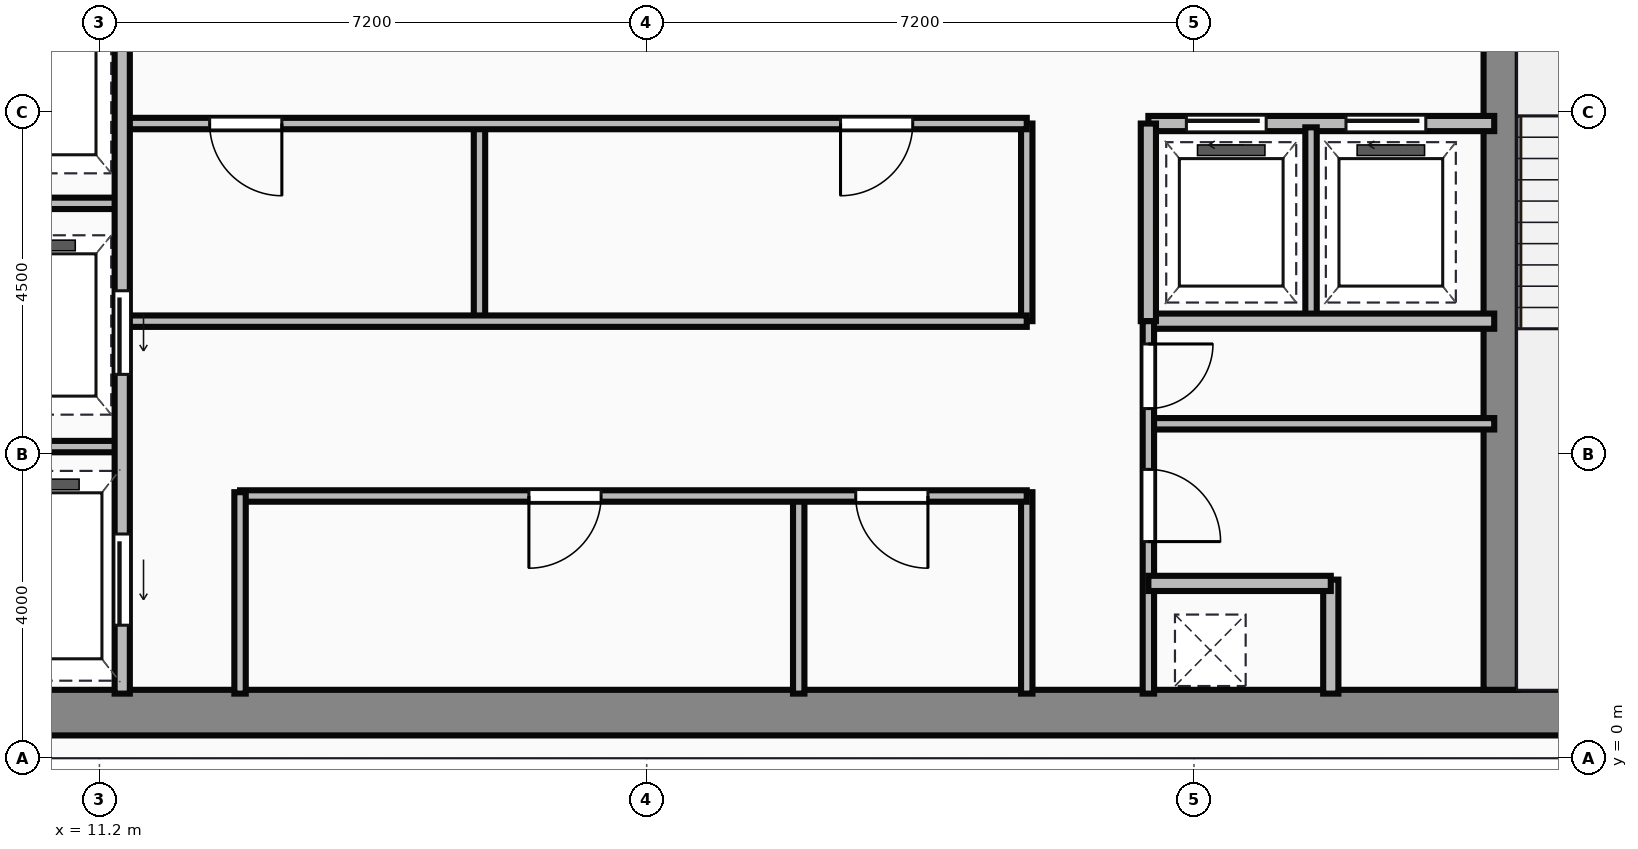
"""IFC4 building model, lengths in metres.
Left out: names, types, materials, properties, quantities, classifications, styles, units other than length and angle.
Written with IfcOpenShell. Run it as: python <this file> out.ifc"""

import sys

from ifc_helpers import new_model, si_unit, direction, frame, frame_2d, origin, place, context, subcontext, project, spatial, rectangle, extrude, source, transform, mapped, element, fill, save


model = new_model("IFC4")
c1 = context("Model", 3, precision=1e-05, world=origin(), true_north=direction((0.0, 1.0)))
c2 = subcontext(c1, "Body", "Model", "MODEL_VIEW")
j1 = project(units=[si_unit("LENGTHUNIT", "METRE"), si_unit("PLANEANGLEUNIT", "RADIAN")], contexts=[c1])
p1 = place(None, origin())
s1 = spatial("IfcSite", under=j1, at=p1, CompositionType="ELEMENT")
p2 = place(p1, origin())
s2 = spatial("IfcBuilding", under=s1, at=p2, CompositionType="ELEMENT")
p3 = place(p2, frame((0.0, 0.0, 228.75)))
s3 = spatial("IfcBuildingStorey", under=s2, at=p3, CompositionType="ELEMENT", Elevation=228.75)
m1 = source(origin(), c2, "Body", "SweptSolid", [
    extrude(rectangle(XDim=29.5, YDim=0.6, at=frame_2d((14.75, 0.0))), origin(), (0.0, 0.0, 1.0), 3.65),
])
p4 = place(p3, frame((4.5, 0.6, 0.0), z_axis=(0.0, 0.0, 1.0), x_axis=(1.0, 0.0, 0.0)))
e1 = element("IfcWall", 1, at=p4, inside=s3, PredefinedType="SHEAR", context=c2, shape_type="MappedRepresentation", body=[
    mapped(m1, transform((0.0, 0.0, 0.0))),
])
m2 = source(origin(), c2, "Body", "SweptSolid", [
    extrude(rectangle(XDim=12.5, YDim=0.45, at=frame_2d((6.25, 0.0))), origin(), (0.0, 0.0, 1.0), 3.65),
])
p5 = place(p3, frame((29.635, 0.9, 0.0), z_axis=(0.0, 0.0, 1.0), x_axis=(0.0, 1.0, 0.0)))
e2 = element("IfcWall", 2, at=p5, inside=s3, PredefinedType="SHEAR", context=c2, shape_type="MappedRepresentation", body=[
    mapped(m2, transform((0.0, 0.0, 0.0))),
])
m3 = source(origin(), c2, "Body", "SweptSolid", [
    extrude(rectangle(XDim=9.6, YDim=0.2, at=frame_2d((4.8, 0.0))), origin(), (0.0, 0.0, 1.0), 3.4),
])
p6 = place(p3, frame((11.5, 0.85, 0.0), z_axis=(0.0, 0.0, 1.0), x_axis=(0.0, 1.0, 0.0)))
e3 = element("IfcWall", 3, at=p6, inside=s3, PredefinedType="PARTITIONING", context=c2, shape_type="MappedRepresentation", body=[
    mapped(m3, transform((0.0, 0.0, 0.0))),
])
p7 = place(p6, frame((4.2, 0.0, 0.0)))
e4 = element("IfcOpeningElement", 4, at=p7, cuts=e3, PredefinedType="OPENING", context=c2, shape_type="SweptSolid", body=[
    extrude(rectangle(XDim=1.1, YDim=2.15, at=frame_2d((0.55, 1.075))), frame((0.0, 0.11, 0.0), z_axis=(0.0, -1.0, 0.0), x_axis=(1.0, 0.0, 0.0)), (0.0, 0.0, 1.0), 0.22),
])
p8 = place(p6, frame((0.9, 0.0, 0.0)))
e5 = element("IfcOpeningElement", 5, at=p8, cuts=e3, PredefinedType="OPENING", context=c2, shape_type="SweptSolid", body=[
    extrude(rectangle(XDim=1.2, YDim=2.15, at=frame_2d((0.6, 1.075))), frame((0.0, 0.11, 0.0), z_axis=(0.0, -1.0, 0.0), x_axis=(1.0, 0.0, 0.0)), (0.0, 0.0, 1.0), 0.22),
])
m4 = source(origin(), c2, "Body", "SweptSolid", [
    extrude(rectangle(XDim=2.4, YDim=0.15, at=frame_2d((1.2, 0.0))), origin(), (0.0, 0.0, 1.0), 3.4),
])
for number, where, z_axis, x_axis in (
    (6, (9.1, 4.1, 0.0), (0.0, 0.0, 1.0), (1.0, 0.0, 0.0)),
    (7, (9.1, 7.3, 0.0), (0.0, 0.0, 1.0), (1.0, 0.0, 0.0)),
):
    element("IfcWall", number, at=place(p3, frame(where, z_axis=z_axis, x_axis=x_axis)), inside=s3, PredefinedType="PARTITIONING", context=c2, shape_type="MappedRepresentation", body=[
        mapped(m4, transform((0.0, 0.0, 0.0))),
    ])
m5 = source(origin(), c2, "Body", "SweptSolid", [
    extrude(rectangle(XDim=2.65, YDim=0.15, at=frame_2d((1.325, 0.0))), origin(), (0.0, 0.0, 1.0), 3.4),
])
p9 = place(p3, frame((13.05, 0.85, 0.0), z_axis=(0.0, 0.0, 1.0), x_axis=(0.0, 1.0, 0.0)))
e8 = element("IfcWall", 8, at=p9, inside=s3, PredefinedType="PARTITIONING", context=c2, shape_type="MappedRepresentation", body=[
    mapped(m5, transform((0.0, 0.0, 0.0))),
])
m6 = source(origin(), c2, "Body", "SweptSolid", [
    extrude(rectangle(XDim=10.35, YDim=0.15, at=frame_2d((5.175, 0.0))), origin(), (0.0, 0.0, 1.0), 3.4),
])
p10 = place(p3, frame((13.05, 3.45, 0.0), z_axis=(0.0, 0.0, 1.0), x_axis=(1.0, 0.0, 0.0)))
e9 = element("IfcWall", 9, at=p10, inside=s3, PredefinedType="PARTITIONING", context=c2, shape_type="MappedRepresentation", body=[
    mapped(m6, transform((0.0, 0.0, 0.0))),
])
p11 = place(p10, frame((3.8, 0.0, 0.0)))
e10 = element("IfcOpeningElement", 10, at=p11, cuts=e9, PredefinedType="OPENING", context=c2, shape_type="SweptSolid", body=[
    extrude(rectangle(XDim=0.95, YDim=2.15, at=frame_2d((0.475, 1.075))), frame((0.0, 0.085, 0.0), z_axis=(0.0, -1.0, 0.0), x_axis=(1.0, 0.0, 0.0)), (0.0, 0.0, 1.0), 0.17),
])
p12 = place(p10, frame((8.1, 0.0, 0.0)))
e11 = element("IfcOpeningElement", 11, at=p12, cuts=e9, PredefinedType="OPENING", context=c2, shape_type="SweptSolid", body=[
    extrude(rectangle(XDim=0.95, YDim=2.15, at=frame_2d((0.475, 1.075))), frame((0.0, 0.085, 0.0), z_axis=(0.0, -1.0, 0.0), x_axis=(1.0, 0.0, 0.0)), (0.0, 0.0, 1.0), 0.17),
])
p13 = place(p3, frame((23.4, 0.85, 0.0), z_axis=(0.0, 0.0, 1.0), x_axis=(0.0, 1.0, 0.0)))
e12 = element("IfcWall", 12, at=p13, inside=s3, PredefinedType="PARTITIONING", context=c2, shape_type="MappedRepresentation", body=[
    mapped(m5, transform((0.0, 0.0, 0.0))),
])
m7 = source(origin(), c2, "Body", "SweptSolid", [
    extrude(rectangle(XDim=2.6, YDim=0.15, at=frame_2d((1.3, 0.0))), origin(), (0.0, 0.0, 1.0), 3.4),
])
p14 = place(p3, frame((20.4, 0.85, 0.0), z_axis=(0.0, 0.0, 1.0), x_axis=(0.0, 1.0, 0.0)))
e13 = element("IfcWall", 13, at=p14, inside=s3, PredefinedType="PARTITIONING", context=c2, shape_type="MappedRepresentation", body=[
    mapped(m7, transform((0.0, 0.0, 0.0))),
])
m8 = source(origin(), c2, "Body", "SweptSolid", [
    extrude(rectangle(XDim=11.85, YDim=0.15, at=frame_2d((5.925, 0.0))), origin(), (0.0, 0.0, 1.0), 3.4),
])
p15 = place(p3, frame((11.55, 5.75, 0.0), z_axis=(0.0, 0.0, 1.0), x_axis=(1.0, 0.0, 0.0)))
e14 = element("IfcWall", 14, at=p15, inside=s3, PredefinedType="PARTITIONING", context=c2, shape_type="MappedRepresentation", body=[
    mapped(m8, transform((0.0, 0.0, 0.0))),
])
p16 = place(p3, frame((11.55, 8.35, 0.0), z_axis=(0.0, 0.0, 1.0), x_axis=(1.0, 0.0, 0.0)))
e15 = element("IfcWall", 15, at=p16, inside=s3, PredefinedType="PARTITIONING", context=c2, shape_type="MappedRepresentation", body=[
    mapped(m8, transform((0.0, 0.0, 0.0))),
])
p17 = place(p16, frame((1.1, 0.0, 0.0)))
e16 = element("IfcOpeningElement", 16, at=p17, cuts=e15, PredefinedType="OPENING", context=c2, shape_type="SweptSolid", body=[
    extrude(rectangle(XDim=0.95, YDim=2.15, at=frame_2d((0.475, 1.075))), frame((0.0, 0.085, 0.0), z_axis=(0.0, -1.0, 0.0), x_axis=(1.0, 0.0, 0.0)), (0.0, 0.0, 1.0), 0.17),
])
p18 = place(p16, frame((9.4, 0.0, 0.0)))
e17 = element("IfcOpeningElement", 17, at=p18, cuts=e15, PredefinedType="OPENING", context=c2, shape_type="SweptSolid", body=[
    extrude(rectangle(XDim=0.95, YDim=2.15, at=frame_2d((0.475, 1.075))), frame((0.0, 0.085, 0.0), z_axis=(0.0, -1.0, 0.0), x_axis=(1.0, 0.0, 0.0)), (0.0, 0.0, 1.0), 0.17),
])
m9 = source(origin(), c2, "Body", "SweptSolid", [
    extrude(rectangle(XDim=2.6, YDim=0.15, at=frame_2d((1.3, 0.0))), origin(), (0.0, 0.0, 1.0), 3.4),
])
p19 = place(p3, frame((23.4, 5.75, 0.0), z_axis=(0.0, 0.0, 1.0), x_axis=(0.0, 1.0, 0.0)))
e18 = element("IfcWall", 18, at=p19, inside=s3, PredefinedType="PARTITIONING", context=c2, shape_type="MappedRepresentation", body=[
    mapped(m9, transform((0.0, 0.0, 0.0))),
])
m10 = source(origin(), c2, "Body", "SweptSolid", [
    extrude(rectangle(XDim=2.5, YDim=0.15, at=frame_2d((1.25, 0.0))), origin(), (0.0, 0.0, 1.0), 3.4),
])
p20 = place(p3, frame((16.2, 5.8, 0.0), z_axis=(0.0, 0.0, 1.0), x_axis=(0.0, 1.0, 0.0)))
e19 = element("IfcWall", 19, at=p20, inside=s3, PredefinedType="PARTITIONING", context=c2, shape_type="MappedRepresentation", body=[
    mapped(m10, transform((0.0, 0.0, 0.0))),
])
m11 = source(origin(), c2, "Body", "SweptSolid", [
    extrude(rectangle(XDim=4.55, YDim=0.2, at=frame_2d((2.275, 0.0))), origin(), (0.0, 0.0, 1.0), 3.4),
])
p21 = place(p3, frame((25.0, 8.35, 0.0), z_axis=(0.0, 0.0, 1.0), x_axis=(1.0, 0.0, 0.0)))
e20 = element("IfcWall", 20, at=p21, inside=s3, PredefinedType="PARTITIONING", context=c2, shape_type="MappedRepresentation", body=[
    mapped(m11, transform((0.0, 0.0, 0.0))),
])
p22 = place(p21, frame((0.5, 0.0, 0.0)))
e21 = element("IfcOpeningElement", 21, at=p22, cuts=e20, PredefinedType="OPENING", context=c2, shape_type="SweptSolid", body=[
    extrude(rectangle(XDim=1.05, YDim=2.15, at=frame_2d((0.525, 1.075))), frame((0.0, 0.11, 0.0), z_axis=(0.0, -1.0, 0.0), x_axis=(1.0, 0.0, 0.0)), (0.0, 0.0, 1.0), 0.22),
])
p23 = place(p21, frame((2.6, 0.0, 0.0)))
e22 = element("IfcOpeningElement", 22, at=p23, cuts=e20, PredefinedType="OPENING", context=c2, shape_type="SweptSolid", body=[
    extrude(rectangle(XDim=1.05, YDim=2.15, at=frame_2d((0.525, 1.075))), frame((0.0, 0.11, 0.0), z_axis=(0.0, -1.0, 0.0), x_axis=(1.0, 0.0, 0.0)), (0.0, 0.0, 1.0), 0.22),
])
p24 = place(p3, frame((25.0, 5.75, 0.0), z_axis=(0.0, 0.0, 1.0), x_axis=(1.0, 0.0, 0.0)))
e23 = element("IfcWall", 23, at=p24, inside=s3, PredefinedType="PARTITIONING", context=c2, shape_type="MappedRepresentation", body=[
    mapped(m11, transform((0.0, 0.0, 0.0))),
])
m12 = source(origin(), c2, "Body", "SweptSolid", [
    extrude(rectangle(XDim=2.6, YDim=0.2, at=frame_2d((1.3, 0.0))), origin(), (0.0, 0.0, 1.0), 3.4),
])
p25 = place(p3, frame((25.0, 5.75, 0.0), z_axis=(0.0, 0.0, 1.0), x_axis=(0.0, 1.0, 0.0)))
e24 = element("IfcWall", 24, at=p25, inside=s3, PredefinedType="PARTITIONING", context=c2, shape_type="MappedRepresentation", body=[
    mapped(m12, transform((0.0, 0.0, 0.0))),
])
p26 = place(p3, frame((27.14, 5.8, 0.0), z_axis=(0.0, 0.0, 1.0), x_axis=(0.0, 1.0, 0.0)))
e25 = element("IfcWall", 25, at=p26, inside=s3, PredefinedType="PARTITIONING", context=c2, shape_type="MappedRepresentation", body=[
    mapped(m10, transform((0.0, 0.0, 0.0))),
])
m13 = source(origin(), c2, "Body", "SweptSolid", [
    extrude(rectangle(XDim=4.9, YDim=0.15, at=frame_2d((2.45, 0.0))), origin(), (0.0, 0.0, 1.0), 3.4),
])
p27 = place(p3, frame((25.0, 0.85, 0.0), z_axis=(0.0, 0.0, 1.0), x_axis=(0.0, 1.0, 0.0)))
e26 = element("IfcWall", 26, at=p27, inside=s3, PredefinedType="PARTITIONING", context=c2, shape_type="MappedRepresentation", body=[
    mapped(m13, transform((0.0, 0.0, 0.0))),
])
p28 = place(p27, frame((2.0, 0.0, 0.0)))
e27 = element("IfcOpeningElement", 27, at=p28, cuts=e26, PredefinedType="OPENING", context=c2, shape_type="SweptSolid", body=[
    extrude(rectangle(XDim=0.95, YDim=2.15, at=frame_2d((0.475, 1.075))), frame((0.0, 0.085, 0.0), z_axis=(0.0, -1.0, 0.0), x_axis=(1.0, 0.0, 0.0)), (0.0, 0.0, 1.0), 0.17),
])
p29 = place(p27, frame((3.75, 0.0, 0.0)))
e28 = element("IfcOpeningElement", 28, at=p29, cuts=e26, PredefinedType="OPENING", context=c2, shape_type="SweptSolid", body=[
    extrude(rectangle(XDim=0.85, YDim=2.15, at=frame_2d((0.425, 1.075))), frame((0.0, 0.085, 0.0), z_axis=(0.0, -1.0, 0.0), x_axis=(1.0, 0.0, 0.0)), (0.0, 0.0, 1.0), 0.17),
])
m14 = source(origin(), c2, "Body", "SweptSolid", [
    extrude(rectangle(XDim=2.4, YDim=0.2, at=frame_2d((1.2, 0.0))), origin(), (0.0, 0.0, 1.0), 3.4),
])
p30 = place(p3, frame((25.0, 2.3, 0.0), z_axis=(0.0, 0.0, 1.0), x_axis=(1.0, 0.0, 0.0)))
e29 = element("IfcWall", 29, at=p30, inside=s3, PredefinedType="PARTITIONING", context=c2, shape_type="MappedRepresentation", body=[
    mapped(m14, transform((0.0, 0.0, 0.0))),
])
m15 = source(origin(), c2, "Body", "SweptSolid", [
    extrude(rectangle(XDim=1.5, YDim=0.2, at=frame_2d((0.75, 0.0))), origin(), (0.0, 0.0, 1.0), 3.4),
])
p31 = place(p3, frame((27.4, 0.85, 0.0), z_axis=(0.0, 0.0, 1.0), x_axis=(0.0, 1.0, 0.0)))
e30 = element("IfcWall", 30, at=p31, inside=s3, PredefinedType="PARTITIONING", context=c2, shape_type="MappedRepresentation", body=[
    mapped(m15, transform((0.0, 0.0, 0.0))),
])
m16 = source(origin(), c2, "Body", "SweptSolid", [
    extrude(rectangle(XDim=4.55, YDim=0.15, at=frame_2d((2.275, 0.0))), origin(), (0.0, 0.0, 1.0), 3.4),
])
p32 = place(p3, frame((25.0, 4.4, 0.0), z_axis=(0.0, 0.0, 1.0), x_axis=(1.0, 0.0, 0.0)))
e31 = element("IfcWall", 31, at=p32, inside=s3, PredefinedType="PARTITIONING", context=c2, shape_type="MappedRepresentation", body=[
    mapped(m16, transform((0.0, 0.0, 0.0))),
])
m17 = source(origin(), c2, "Body", "SweptSolid", [
    extrude(rectangle(XDim=1.1, YDim=2.15, at=frame_2d((0.55, 1.075))), frame((0.0, 0.025, 0.0), z_axis=(0.0, -1.0, 0.0), x_axis=(1.0, 0.0, 0.0)), (0.0, 0.0, 1.0), 0.05),
])
p33 = place(p7, frame((1.1, 0.0, 0.0), z_axis=(0.0, 0.0, 1.0), x_axis=(-1.0, 0.0, 0.0)))
e32 = element("IfcDoor", 32, at=p33, inside=s3, OperationType="SLIDING_TO_LEFT", PredefinedType="DOOR", context=c2, shape_type="MappedRepresentation", body=[
    mapped(m17, transform((0.0, 0.0, 0.0))),
])
fill(e4, e32)
m18 = source(origin(), c2, "Body", "SweptSolid", [
    extrude(rectangle(XDim=1.2, YDim=2.15, at=frame_2d((0.6, 1.075))), frame((0.0, 0.025, 0.0), z_axis=(0.0, -1.0, 0.0), x_axis=(1.0, 0.0, 0.0)), (0.0, 0.0, 1.0), 0.05),
])
p34 = place(p8, frame((1.2, 0.0, 0.0), z_axis=(0.0, 0.0, 1.0), x_axis=(-1.0, 0.0, 0.0)))
e33 = element("IfcDoor", 33, at=p34, inside=s3, OperationType="SLIDING_TO_LEFT", PredefinedType="DOOR", context=c2, shape_type="MappedRepresentation", body=[
    mapped(m18, transform((0.0, 0.0, 0.0))),
])
fill(e5, e33)
m19 = source(origin(), c2, "Body", "SweptSolid", [
    extrude(rectangle(XDim=0.95, YDim=2.15, at=frame_2d((0.475, 1.075))), frame((0.0, 0.025, 0.0), z_axis=(0.0, -1.0, 0.0), x_axis=(1.0, 0.0, 0.0)), (0.0, 0.0, 1.0), 0.05),
])
p35 = place(p11, origin())
e34 = element("IfcDoor", 34, at=p35, inside=s3, OperationType="SINGLE_SWING_LEFT", PredefinedType="DOOR", context=c2, shape_type="MappedRepresentation", body=[
    mapped(m19, transform((0.0, 0.0, 0.0))),
])
fill(e10, e34)
p36 = place(p12, origin())
e35 = element("IfcDoor", 35, at=p36, inside=s3, OperationType="SINGLE_SWING_RIGHT", PredefinedType="DOOR", context=c2, shape_type="MappedRepresentation", body=[
    mapped(m19, transform((0.0, 0.0, 0.0))),
])
fill(e11, e35)
p37 = place(p17, origin())
e36 = element("IfcDoor", 36, at=p37, inside=s3, OperationType="SINGLE_SWING_RIGHT", PredefinedType="DOOR", context=c2, shape_type="MappedRepresentation", body=[
    mapped(m19, transform((0.0, 0.0, 0.0))),
])
fill(e16, e36)
p38 = place(p18, origin())
e37 = element("IfcDoor", 37, at=p38, inside=s3, OperationType="SINGLE_SWING_LEFT", PredefinedType="DOOR", context=c2, shape_type="MappedRepresentation", body=[
    mapped(m19, transform((0.0, 0.0, 0.0))),
])
fill(e17, e37)
m20 = source(origin(), c2, "Body", "SweptSolid", [
    extrude(rectangle(XDim=1.05, YDim=2.15, at=frame_2d((0.525, 1.075))), frame((0.0, 0.025, 0.0), z_axis=(0.0, -1.0, 0.0), x_axis=(1.0, 0.0, 0.0)), (0.0, 0.0, 1.0), 0.05),
])
p39 = place(p22, origin())
e38 = element("IfcDoor", 38, at=p39, inside=s3, OperationType="SLIDING_TO_LEFT", PredefinedType="DOOR", context=c2, shape_type="MappedRepresentation", body=[
    mapped(m20, transform((0.0, 0.0, 0.0))),
])
fill(e21, e38)
p40 = place(p23, origin())
e39 = element("IfcDoor", 39, at=p40, inside=s3, OperationType="SLIDING_TO_LEFT", PredefinedType="DOOR", context=c2, shape_type="MappedRepresentation", body=[
    mapped(m20, transform((0.0, 0.0, 0.0))),
])
fill(e22, e39)
p41 = place(p28, origin())
e40 = element("IfcDoor", 40, at=p41, inside=s3, OperationType="SINGLE_SWING_LEFT", PredefinedType="DOOR", context=c2, shape_type="MappedRepresentation", body=[
    mapped(m19, transform((0.0, 0.0, 0.0))),
])
fill(e27, e40)
m21 = source(origin(), c2, "Body", "SweptSolid", [
    extrude(rectangle(XDim=0.85, YDim=2.15, at=frame_2d((0.425, 1.075))), frame((0.0, 0.025, 0.0), z_axis=(0.0, -1.0, 0.0), x_axis=(1.0, 0.0, 0.0)), (0.0, 0.0, 1.0), 0.05),
])
p42 = place(p29, origin())
e41 = element("IfcDoor", 41, at=p42, inside=s3, OperationType="SINGLE_SWING_RIGHT", PredefinedType="DOOR", context=c2, shape_type="MappedRepresentation", body=[
    mapped(m21, transform((0.0, 0.0, 0.0))),
])
fill(e28, e41)
save(model, sys.argv[1])
